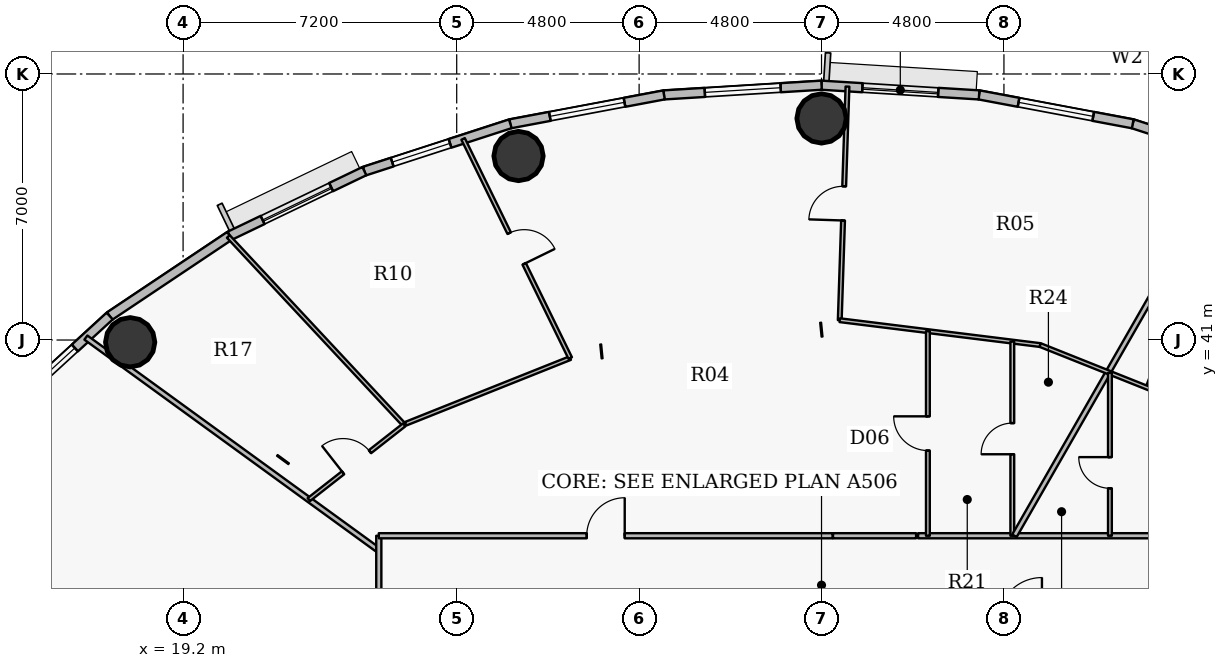
"""IFC4 building model, lengths in metres.
Left out: names, types, materials, properties, quantities, classifications, styles, units other than length and angle.
Written with IfcOpenShell. Run it as: python <this file> out.ifc"""

import sys

from ifc_helpers import new_model, si_unit, direction, frame, frame_2d, origin, origin_2d, place, context, subcontext, project, spatial, rectangle, hollow_circle, extrude, source, transform, mapped, element, fill, save


model = new_model("IFC4")
c1 = context("Model", 3, precision=1e-05, world=origin(), true_north=direction((0.0, 1.0)))
c2 = subcontext(c1, "Body", "Model", "MODEL_VIEW")
j1 = project(units=[si_unit("LENGTHUNIT", "METRE"), si_unit("PLANEANGLEUNIT", "RADIAN")], contexts=[c1])
p1 = place(None, origin())
s1 = spatial("IfcSite", under=j1, at=p1, CompositionType="ELEMENT")
p2 = place(p1, origin())
s2 = spatial("IfcBuilding", under=s1, at=p2, CompositionType="ELEMENT")
p3 = place(p2, frame((0.0, 0.0, 193.65)))
s3 = spatial("IfcBuildingStorey", under=s2, at=p3, CompositionType="ELEMENT", Elevation=193.65)
for number, where, z_axis, x_axis in (
    (1, (36.0, 46.83, 0.0), (0.0, 0.0, 1.0), (1.0, 0.0, 0.0)),
    (2, (28.027, 45.841, 0.0), (0.0, 0.0, 1.0), (1.0, 0.0, 0.0)),
    (3, (17.808, 40.942, 0.0), (0.0, 0.0, 1.0), (1.0, 0.0, 0.0)),
):
    element("IfcColumn", number, at=place(p3, frame(where, z_axis=z_axis, x_axis=x_axis)), inside=s3, PredefinedType="COLUMN", context=c2, shape_type="SweptSolid", body=[
        extrude(hollow_circle(Radius=0.65, WallThickness=0.04, at=origin_2d()), origin(), (0.0, 0.0, 1.0), 3.75),
    ])
p4 = place(p3, frame((44.189, 46.689, 0.0), z_axis=(0.0, 0.0, 1.0), x_axis=(0.951209870236, -0.30854462038, 0.0)))
e4 = element("IfcWall", 4, at=p4, inside=s3, PredefinedType="SOLIDWALL", context=c2, shape_type="SweptSolid", body=[
    extrude(rectangle(XDim=4.038, YDim=0.24, at=frame_2d((2.019, 0.0))), origin(), (0.0, 0.0, 1.0), 3.5),
])
p5 = place(p4, frame((0.757, 0.0, 0.9)))
e5 = element("IfcOpeningElement", 5, at=p5, cuts=e4, PredefinedType="OPENING", context=c2, shape_type="SweptSolid", body=[
    extrude(rectangle(XDim=1.6, YDim=1.75, at=origin_2d()), frame((0.8, 0.13, 0.875), z_axis=(0.0, -1.0, 0.0), x_axis=(1.0, 0.0, 0.0)), (0.0, 0.0, 1.0), 0.26),
])
p6 = place(p3, frame((40.146, 47.449, 0.0), z_axis=(0.0, 0.0, 1.0), x_axis=(0.982788108205, -0.184736391573, 0.0)))
e6 = element("IfcWall", 6, at=p6, inside=s3, PredefinedType="SOLIDWALL", context=c2, shape_type="SweptSolid", body=[
    extrude(rectangle(XDim=4.114, YDim=0.24, at=frame_2d((2.057, 0.0))), origin(), (0.0, 0.0, 1.0), 3.5),
])
p7 = place(p6, frame((1.057, 0.0, 0.9)))
e7 = element("IfcOpeningElement", 7, at=p7, cuts=e6, PredefinedType="OPENING", context=c2, shape_type="SweptSolid", body=[
    extrude(rectangle(XDim=2.0, YDim=1.75, at=origin_2d()), frame((1.0, 0.13, 0.875), z_axis=(0.0, -1.0, 0.0), x_axis=(1.0, 0.0, 0.0)), (0.0, 0.0, 1.0), 0.26),
])
p8 = place(p3, frame((36.0, 47.705, 0.0), z_axis=(0.0, 0.0, 1.0), x_axis=(0.998104600619, -0.061540281305, 0.0)))
e8 = element("IfcWall", 8, at=p8, inside=s3, PredefinedType="SOLIDWALL", context=c2, shape_type="SweptSolid", body=[
    extrude(rectangle(XDim=4.154, YDim=0.24, at=frame_2d((2.077, 0.0))), origin(), (0.0, 0.0, 1.0), 3.5),
])
p9 = place(p8, frame((1.077, 0.0, 0.9)))
e9 = element("IfcOpeningElement", 9, at=p9, cuts=e8, PredefinedType="OPENING", context=c2, shape_type="SweptSolid", body=[
    extrude(rectangle(XDim=2.0, YDim=1.75, at=origin_2d()), frame((1.0, 0.13, 0.875), z_axis=(0.0, -1.0, 0.0), x_axis=(1.0, 0.0, 0.0)), (0.0, 0.0, 1.0), 0.26),
])
p10 = place(p3, frame((31.854, 47.449, 0.0), z_axis=(0.0, 0.0, 1.0), x_axis=(0.998104600619, 0.061540281305, 0.0)))
e10 = element("IfcWall", 10, at=p10, inside=s3, PredefinedType="SOLIDWALL", context=c2, shape_type="SweptSolid", body=[
    extrude(rectangle(XDim=4.154, YDim=0.24, at=frame_2d((2.077, 0.0))), origin(), (0.0, 0.0, 1.0), 3.5),
])
p11 = place(p10, frame((1.077, 0.0, 0.9)))
e11 = element("IfcOpeningElement", 11, at=p11, cuts=e10, PredefinedType="OPENING", context=c2, shape_type="SweptSolid", body=[
    extrude(rectangle(XDim=2.0, YDim=1.75, at=origin_2d()), frame((1.0, 0.13, 0.875), z_axis=(0.0, -1.0, 0.0), x_axis=(1.0, 0.0, 0.0)), (0.0, 0.0, 1.0), 0.26),
])
p12 = place(p3, frame((27.811, 46.689, 0.0), z_axis=(0.0, 0.0, 1.0), x_axis=(0.982788108205, 0.184736391573, 0.0)))
e12 = element("IfcWall", 12, at=p12, inside=s3, PredefinedType="SOLIDWALL", context=c2, shape_type="SweptSolid", body=[
    extrude(rectangle(XDim=4.114, YDim=0.24, at=frame_2d((2.057, 0.0))), origin(), (0.0, 0.0, 1.0), 3.5),
])
p13 = place(p12, frame((1.057, 0.0, 0.9)))
e13 = element("IfcOpeningElement", 13, at=p13, cuts=e12, PredefinedType="OPENING", context=c2, shape_type="SweptSolid", body=[
    extrude(rectangle(XDim=2.0, YDim=1.75, at=origin_2d()), frame((1.0, 0.13, 0.875), z_axis=(0.0, -1.0, 0.0), x_axis=(1.0, 0.0, 0.0)), (0.0, 0.0, 1.0), 0.26),
])
p14 = place(p3, frame((23.97, 45.444, 0.0), z_axis=(0.0, 0.0, 1.0), x_axis=(0.951209870236, 0.30854462038, 0.0)))
e14 = element("IfcWall", 14, at=p14, inside=s3, PredefinedType="SOLIDWALL", context=c2, shape_type="SweptSolid", body=[
    extrude(rectangle(XDim=4.038, YDim=0.24, at=frame_2d((2.019, 0.0))), origin(), (0.0, 0.0, 1.0), 3.5),
])
p15 = place(p14, frame((0.77, 0.0, 0.9)))
e15 = element("IfcOpeningElement", 15, at=p15, cuts=e14, PredefinedType="OPENING", context=c2, shape_type="SweptSolid", body=[
    extrude(rectangle(XDim=1.6, YDim=1.75, at=origin_2d()), frame((0.8, 0.13, 0.875), z_axis=(0.0, -1.0, 0.0), x_axis=(1.0, 0.0, 0.0)), (0.0, 0.0, 1.0), 0.26),
])
p16 = place(p3, frame((20.427, 43.743, 0.0), z_axis=(0.0, 0.0, 1.0), x_axis=(0.901564733809, 0.432644231155, 0.0)))
e16 = element("IfcWall", 16, at=p16, inside=s3, PredefinedType="SOLIDWALL", context=c2, shape_type="SweptSolid", body=[
    extrude(rectangle(XDim=3.93, YDim=0.24, at=frame_2d((1.965, 0.0))), origin(), (0.0, 0.0, 1.0), 3.5),
])
p17 = place(p16, frame((0.96, 0.0, 0.9)))
e17 = element("IfcOpeningElement", 17, at=p17, cuts=e16, PredefinedType="OPENING", context=c2, shape_type="SweptSolid", body=[
    extrude(rectangle(XDim=2.0, YDim=1.75, at=origin_2d()), frame((1.0, 0.13, 0.875), z_axis=(0.0, -1.0, 0.0), x_axis=(1.0, 0.0, 0.0)), (0.0, 0.0, 1.0), 0.26),
])
p18 = place(p3, frame((17.268, 41.631, 0.0), z_axis=(0.0, 0.0, 1.0), x_axis=(0.831228998277, 0.555930168657, 0.0)))
e18 = element("IfcWall", 18, at=p18, inside=s3, PredefinedType="SOLIDWALL", context=c2, shape_type="SweptSolid", body=[
    extrude(rectangle(XDim=3.8, YDim=0.24, at=frame_2d((1.9, 0.0))), origin(), (0.0, 0.0, 1.0), 3.5),
])
p19 = place(p3, frame((14.572, 39.158, 0.0), z_axis=(0.0, 0.0, 1.0), x_axis=(0.737076565834, 0.675809245349, 0.0)))
e19 = element("IfcWall", 19, at=p19, inside=s3, PredefinedType="SOLIDWALL", context=c2, shape_type="SweptSolid", body=[
    extrude(rectangle(XDim=3.658, YDim=0.24, at=frame_2d((1.829, 0.0))), origin(), (0.0, 0.0, 1.0), 3.5),
])
p20 = place(p19, frame((0.815, 0.0, 0.9)))
e20 = element("IfcOpeningElement", 20, at=p20, cuts=e19, PredefinedType="OPENING", context=c2, shape_type="SweptSolid", body=[
    extrude(rectangle(XDim=1.6, YDim=1.75, at=origin_2d()), frame((0.8, 0.13, 0.875), z_axis=(0.0, -1.0, 0.0), x_axis=(1.0, 0.0, 0.0)), (0.0, 0.0, 1.0), 0.26),
])
p21 = place(p3, frame((16.643, 41.064, 0.0), z_axis=(0.0, 0.0, 1.0), x_axis=(0.809016355942, -0.587786131018, 0.0)))
e21 = element("IfcWall", 21, at=p21, inside=s3, PredefinedType="PARTITIONING", context=c2, shape_type="SweptSolid", body=[
    extrude(rectangle(XDim=9.527, YDim=0.135, at=frame_2d((4.764, 0.0))), origin(), (0.0, 0.0, 1.0), 2.935),
])
p22 = place(p3, frame((20.39, 43.725, 0.0), z_axis=(0.0, 0.0, 1.0), x_axis=(0.682297728918, -0.73107442105, 0.0)))
e22 = element("IfcWall", 22, at=p22, inside=s3, PredefinedType="PARTITIONING", context=c2, shape_type="SweptSolid", body=[
    extrude(rectangle(XDim=6.782, YDim=0.1, at=frame_2d((3.391, 0.0))), origin(), (0.0, 0.0, 1.0), 2.935),
])
p23 = place(p3, frame((22.509, 36.802, 0.0), z_axis=(0.0, 0.0, 1.0), x_axis=(0.787322269852, 0.616541680177, 0.0)))
e23 = element("IfcWall", 23, at=p23, inside=s3, PredefinedType="PARTITIONING", context=c2, shape_type="SweptSolid", body=[
    extrude(rectangle(XDim=3.187, YDim=0.1, at=frame_2d((1.593, 0.0))), origin(), (0.0, 0.0, 1.0), 2.935),
])
p24 = place(p23, frame((1.143, 0.0, 0.0)))
e24 = element("IfcOpeningElement", 24, at=p24, cuts=e23, PredefinedType="OPENING", context=c2, shape_type="SweptSolid", body=[
    extrude(rectangle(XDim=0.9, YDim=2.1, at=origin_2d()), frame((0.45, 0.06, 1.05), z_axis=(0.0, -1.0, 0.0), x_axis=(1.0, 0.0, 0.0)), (0.0, 0.0, 1.0), 0.12),
])
p25 = place(p3, frame((24.35, 27.95, 0.0), z_axis=(0.0, 0.0, 1.0), x_axis=(0.0, 1.0, 0.0)))
e25 = element("IfcWall", 25, at=p25, inside=s3, PredefinedType="PARTITIONING", context=c2, shape_type="SweptSolid", body=[
    extrude(rectangle(XDim=7.9, YDim=0.135, at=frame_2d((3.95, 0.0))), origin(), (0.0, 0.0, 1.0), 2.935),
])
p26 = place(p3, frame((24.35, 35.85, 0.0), z_axis=(0.0, 0.0, 1.0), x_axis=(1.0, 0.0, 0.0)))
e26 = element("IfcWall", 26, at=p26, inside=s3, PredefinedType="PARTITIONING", context=c2, shape_type="SweptSolid", body=[
    extrude(rectangle(XDim=11.942, YDim=0.135, at=frame_2d((5.971, 0.0))), origin(), (0.0, 0.0, 1.0), 2.935),
])
p27 = place(p26, frame((5.471, 0.0, 0.0)))
e27 = element("IfcOpeningElement", 27, at=p27, cuts=e26, PredefinedType="OPENING", context=c2, shape_type="SweptSolid", body=[
    extrude(rectangle(XDim=1.0, YDim=2.15, at=origin_2d()), frame((0.5, 0.078, 1.075), z_axis=(0.0, -1.0, 0.0), x_axis=(1.0, 0.0, 0.0)), (0.0, 0.0, 1.0), 0.155),
])
p28 = place(p3, frame((25.055, 38.796, 0.0), z_axis=(0.0, 0.0, 1.0), x_axis=(0.928801214375, 0.370578337434, 0.0)))
e28 = element("IfcWall", 28, at=p28, inside=s3, PredefinedType="PARTITIONING", context=c2, shape_type="SweptSolid", body=[
    extrude(rectangle(XDim=4.664, YDim=0.1, at=frame_2d((2.332, 0.0))), origin(), (0.0, 0.0, 1.0), 3.5),
])
p29 = place(p3, frame((26.568, 46.292, 0.0), z_axis=(0.0, 0.0, 1.0), x_axis=(0.439223775301, -0.898377690735, 0.0)))
e29 = element("IfcWall", 29, at=p29, inside=s3, PredefinedType="PARTITIONING", context=c2, shape_type="SweptSolid", body=[
    extrude(rectangle(XDim=6.419, YDim=0.1, at=frame_2d((3.209, 0.0))), origin(), (0.0, 0.0, 1.0), 2.935),
])
p30 = place(p29, frame((2.76, 0.0, 0.0)))
e30 = element("IfcOpeningElement", 30, at=p30, cuts=e29, PredefinedType="OPENING", context=c2, shape_type="SweptSolid", body=[
    extrude(rectangle(XDim=0.9, YDim=2.1, at=origin_2d()), frame((0.45, 0.06, 1.05), z_axis=(0.0, -1.0, 0.0), x_axis=(1.0, 0.0, 0.0)), (0.0, 0.0, 1.0), 0.12),
])
p31 = place(p3, frame((36.48, 41.521, 0.0), z_axis=(0.0, 0.0, 1.0), x_axis=(0.033029315495, 0.99945438331, 0.0)))
e31 = element("IfcWall", 31, at=p31, inside=s3, PredefinedType="PARTITIONING", context=c2, shape_type="SweptSolid", body=[
    extrude(rectangle(XDim=6.15, YDim=0.1, at=frame_2d((3.075, 0.0))), origin(), (0.0, 0.0, 1.0), 2.935),
])
p32 = place(p31, frame((2.625, 0.0, 0.0)))
e32 = element("IfcOpeningElement", 32, at=p32, cuts=e31, PredefinedType="OPENING", context=c2, shape_type="SweptSolid", body=[
    extrude(rectangle(XDim=0.9, YDim=2.1, at=origin_2d()), frame((0.45, 0.06, 1.05), z_axis=(0.0, -1.0, 0.0), x_axis=(1.0, 0.0, 0.0)), (0.0, 0.0, 1.0), 0.12),
])
p33 = place(p3, frame((36.48, 41.521, 0.0), z_axis=(0.0, 0.0, 1.0), x_axis=(0.992397562131, -0.123073468612, 0.0)))
e33 = element("IfcWall", 33, at=p33, inside=s3, PredefinedType="PARTITIONING", context=c2, shape_type="SweptSolid", body=[
    extrude(rectangle(XDim=5.314, YDim=0.1, at=frame_2d((2.657, 0.0))), origin(), (0.0, 0.0, 1.0), 3.5),
])
p34 = place(p3, frame((38.541, 35.85, 0.0), z_axis=(0.0, 0.0, 1.0), x_axis=(1.0, 0.0, 0.0)))
e34 = element("IfcWall", 34, at=p34, inside=s3, PredefinedType="PARTITIONING", context=c2, shape_type="SweptSolid", body=[
    extrude(rectangle(XDim=14.913, YDim=0.135, at=frame_2d((7.456, 0.0))), origin(), (0.0, 0.0, 1.0), 2.935),
])
p35 = place(p34, frame((9.46, 0.0, 0.0)))
e35 = element("IfcOpeningElement", 35, at=p35, cuts=e34, PredefinedType="OPENING", context=c2, shape_type="SweptSolid", body=[
    extrude(rectangle(XDim=1.0, YDim=2.15, at=origin_2d()), frame((0.5, 0.078, 1.075), z_axis=(0.0, -1.0, 0.0), x_axis=(1.0, 0.0, 0.0)), (0.0, 0.0, 1.0), 0.155),
])
p36 = place(p3, frame((38.799, 35.85, 0.0), z_axis=(0.0, 0.0, 1.0), x_axis=(0.0, 1.0, 0.0)))
e36 = element("IfcWall", 36, at=p36, inside=s3, PredefinedType="PARTITIONING", context=c2, shape_type="SweptSolid", body=[
    extrude(rectangle(XDim=5.384, YDim=0.1, at=frame_2d((2.692, 0.0))), origin(), (0.0, 0.0, 1.0), 3.5),
])
p37 = place(p36, frame((2.242, 0.0, 0.0)))
e37 = element("IfcOpeningElement", 37, at=p37, cuts=e36, PredefinedType="OPENING", context=c2, shape_type="SweptSolid", body=[
    extrude(rectangle(XDim=0.9, YDim=2.1, at=origin_2d()), frame((0.45, 0.06, 1.05), z_axis=(0.0, -1.0, 0.0), x_axis=(1.0, 0.0, 0.0)), (0.0, 0.0, 1.0), 0.12),
])
p38 = place(p3, frame((41.02, 35.85, 0.0), z_axis=(0.0, 0.0, 1.0), x_axis=(0.0, 1.0, 0.0)))
e38 = element("IfcWall", 38, at=p38, inside=s3, PredefinedType="PARTITIONING", context=c2, shape_type="SweptSolid", body=[
    extrude(rectangle(XDim=5.108, YDim=0.1, at=frame_2d((2.554, 0.0))), origin(), (0.0, 0.0, 1.0), 3.5),
])
p39 = place(p38, frame((2.144, 0.0, 0.0)))
e39 = element("IfcOpeningElement", 39, at=p39, cuts=e38, PredefinedType="OPENING", context=c2, shape_type="SweptSolid", body=[
    extrude(rectangle(XDim=0.82, YDim=2.1, at=origin_2d()), frame((0.41, 0.06, 1.05), z_axis=(0.0, -1.0, 0.0), x_axis=(1.0, 0.0, 0.0)), (0.0, 0.0, 1.0), 0.12),
])
p40 = place(p3, frame((41.076, 35.85, 0.0), z_axis=(0.0, 0.0, 1.0), x_axis=(0.497557605347, 0.867430936364, 0.0)))
e40 = element("IfcWall", 40, at=p40, inside=s3, PredefinedType="PARTITIONING", context=c2, shape_type="SweptSolid", body=[
    extrude(rectangle(XDim=11.522, YDim=0.135, at=frame_2d((5.761, 0.0))), origin(), (0.0, 0.0, 1.0), 2.935),
])
p41 = place(p3, frame((41.754, 40.867, 0.0), z_axis=(0.0, 0.0, 1.0), x_axis=(0.928792710591, -0.370599650233, 0.0)))
e41 = element("IfcWall", 41, at=p41, inside=s3, PredefinedType="PARTITIONING", context=c2, shape_type="SweptSolid", body=[
    extrude(rectangle(XDim=5.588, YDim=0.1, at=frame_2d((2.794, 0.0))), origin(), (0.0, 0.0, 1.0), 2.935),
])
p42 = place(p41, frame((3.156, 0.0, 0.0)))
e42 = element("IfcOpeningElement", 42, at=p42, cuts=e41, PredefinedType="OPENING", context=c2, shape_type="SweptSolid", body=[
    extrude(rectangle(XDim=0.9, YDim=2.1, at=origin_2d()), frame((0.45, 0.06, 1.05), z_axis=(0.0, -1.0, 0.0), x_axis=(1.0, 0.0, 0.0)), (0.0, 0.0, 1.0), 0.12),
])
p43 = place(p3, frame((43.589, 35.85, 0.0), z_axis=(0.0, 0.0, 1.0), x_axis=(0.0, 1.0, 0.0)))
e43 = element("IfcWall", 43, at=p43, inside=s3, PredefinedType="PARTITIONING", context=c2, shape_type="SweptSolid", body=[
    extrude(rectangle(XDim=4.285, YDim=0.1, at=frame_2d((2.143, 0.0))), origin(), (0.0, 0.0, 1.0), 2.935),
])
p44 = place(p43, frame((1.249, 0.0, 0.0)))
e44 = element("IfcOpeningElement", 44, at=p44, cuts=e43, PredefinedType="OPENING", context=c2, shape_type="SweptSolid", body=[
    extrude(rectangle(XDim=0.82, YDim=2.1, at=origin_2d()), frame((0.41, 0.06, 1.05), z_axis=(0.0, -1.0, 0.0), x_axis=(1.0, 0.0, 0.0)), (0.0, 0.0, 1.0), 0.12),
])
p45 = place(p3, frame((36.302, 35.85, 0.0), z_axis=(0.0, 0.0, 1.0), x_axis=(1.0, 0.0, 0.0)))
e45 = element("IfcWall", 45, at=p45, inside=s3, PredefinedType="PARTITIONING", context=c2, shape_type="SweptSolid", body=[
    extrude(rectangle(XDim=2.187, YDim=0.135, at=frame_2d((1.093, 0.0))), origin(), (0.0, 0.0, 1.0), 3.5),
])
m1 = source(origin(), c2, "Body", "SweptSolid", [
    extrude(rectangle(XDim=2.0, YDim=1.75, at=origin_2d()), frame((1.0, 0.03, 0.875), z_axis=(0.0, -1.0, 0.0), x_axis=(1.0, 0.0, 0.0)), (0.0, 0.0, 1.0), 0.06),
])
p46 = place(p7, origin())
e46 = element("IfcWindow", 46, at=p46, inside=s3, PartitioningType="DOUBLE_PANEL_VERTICAL", PredefinedType="WINDOW", context=c2, shape_type="MappedRepresentation", body=[
    mapped(m1, transform((0.0, 0.0, 0.0), x_axis=(1.0, 0.0, 0.0), y_axis=(0.0, 1.0, 0.0), z_axis=(0.0, 0.0, 1.0), scale=1.0)),
])
fill(e7, e46)
p47 = place(p9, origin())
e47 = element("IfcWindow", 47, at=p47, inside=s3, PartitioningType="DOUBLE_PANEL_VERTICAL", PredefinedType="WINDOW", context=c2, shape_type="MappedRepresentation", body=[
    mapped(m1, transform((0.0, 0.0, 0.0), x_axis=(1.0, 0.0, 0.0), y_axis=(0.0, 1.0, 0.0), z_axis=(0.0, 0.0, 1.0), scale=1.0)),
])
fill(e9, e47)
p48 = place(p11, origin())
e48 = element("IfcWindow", 48, at=p48, inside=s3, PartitioningType="DOUBLE_PANEL_VERTICAL", PredefinedType="WINDOW", context=c2, shape_type="MappedRepresentation", body=[
    mapped(m1, transform((0.0, 0.0, 0.0), x_axis=(1.0, 0.0, 0.0), y_axis=(0.0, 1.0, 0.0), z_axis=(0.0, 0.0, 1.0), scale=1.0)),
])
fill(e11, e48)
p49 = place(p13, origin())
e49 = element("IfcWindow", 49, at=p49, inside=s3, PartitioningType="DOUBLE_PANEL_VERTICAL", PredefinedType="WINDOW", context=c2, shape_type="MappedRepresentation", body=[
    mapped(m1, transform((0.0, 0.0, 0.0), x_axis=(1.0, 0.0, 0.0), y_axis=(0.0, 1.0, 0.0), z_axis=(0.0, 0.0, 1.0), scale=1.0)),
])
fill(e13, e49)
m2 = source(origin(), c2, "Body", "SweptSolid", [
    extrude(rectangle(XDim=1.6, YDim=1.75, at=origin_2d()), frame((0.8, 0.03, 0.875), z_axis=(0.0, -1.0, 0.0), x_axis=(1.0, 0.0, 0.0)), (0.0, 0.0, 1.0), 0.06),
])
p50 = place(p15, origin())
e50 = element("IfcWindow", 50, at=p50, inside=s3, PartitioningType="DOUBLE_PANEL_VERTICAL", PredefinedType="WINDOW", context=c2, shape_type="MappedRepresentation", body=[
    mapped(m2, transform((0.0, 0.0, 0.0), x_axis=(1.0, 0.0, 0.0), y_axis=(0.0, 1.0, 0.0), z_axis=(0.0, 0.0, 1.0), scale=1.0)),
])
fill(e15, e50)
p51 = place(p17, origin())
e51 = element("IfcWindow", 51, at=p51, inside=s3, PartitioningType="DOUBLE_PANEL_VERTICAL", PredefinedType="WINDOW", context=c2, shape_type="MappedRepresentation", body=[
    mapped(m1, transform((0.0, 0.0, 0.0), x_axis=(1.0, 0.0, 0.0), y_axis=(0.0, 1.0, 0.0), z_axis=(0.0, 0.0, 1.0), scale=1.0)),
])
fill(e17, e51)
p52 = place(p20, origin())
e52 = element("IfcWindow", 52, at=p52, inside=s3, PartitioningType="DOUBLE_PANEL_VERTICAL", PredefinedType="WINDOW", context=c2, shape_type="MappedRepresentation", body=[
    mapped(m2, transform((0.0, 0.0, 0.0), x_axis=(1.0, 0.0, 0.0), y_axis=(0.0, 1.0, 0.0), z_axis=(0.0, 0.0, 1.0), scale=1.0)),
])
fill(e20, e52)
m3 = source(origin(), c2, "Body", "SweptSolid", [
    extrude(rectangle(XDim=0.82, YDim=2.1, at=origin_2d()), frame((0.41, 0.025, 1.05), z_axis=(0.0, -1.0, 0.0), x_axis=(1.0, 0.0, 0.0)), (0.0, 0.0, 1.0), 0.05),
])
p53 = place(p44, origin())
e53 = element("IfcDoor", 53, at=p53, inside=s3, OperationType="SINGLE_SWING_RIGHT", PredefinedType="DOOR", context=c2, shape_type="MappedRepresentation", body=[
    mapped(m3, transform((0.0, 0.0, 0.0), x_axis=(1.0, 0.0, 0.0), y_axis=(0.0, 1.0, 0.0), z_axis=(0.0, 0.0, 1.0), scale=1.0)),
])
fill(e44, e53)
m4 = source(origin(), c2, "Body", "SweptSolid", [
    extrude(rectangle(XDim=1.0, YDim=2.15, at=origin_2d()), frame((0.5, 0.025, 1.075), z_axis=(0.0, -1.0, 0.0), x_axis=(1.0, 0.0, 0.0)), (0.0, 0.0, 1.0), 0.05),
])
p54 = place(p27, origin())
e54 = element("IfcDoor", 54, at=p54, inside=s3, OperationType="SINGLE_SWING_RIGHT", PredefinedType="DOOR", context=c2, shape_type="MappedRepresentation", body=[
    mapped(m4, transform((0.0, 0.0, 0.0), x_axis=(1.0, 0.0, 0.0), y_axis=(0.0, 1.0, 0.0), z_axis=(0.0, 0.0, 1.0), scale=1.0)),
])
fill(e27, e54)
m5 = source(origin(), c2, "Body", "SweptSolid", [
    extrude(rectangle(XDim=0.9, YDim=2.1, at=origin_2d()), frame((0.45, 0.025, 1.05), z_axis=(0.0, -1.0, 0.0), x_axis=(1.0, 0.0, 0.0)), (0.0, 0.0, 1.0), 0.05),
])
p55 = place(p32, origin())
e55 = element("IfcDoor", 55, at=p55, inside=s3, OperationType="SINGLE_SWING_LEFT", PredefinedType="DOOR", context=c2, shape_type="MappedRepresentation", body=[
    mapped(m5, transform((0.0, 0.0, 0.0), x_axis=(1.0, 0.0, 0.0), y_axis=(0.0, 1.0, 0.0), z_axis=(0.0, 0.0, 1.0), scale=1.0)),
])
fill(e32, e55)
p56 = place(p30, origin())
e56 = element("IfcDoor", 56, at=p56, inside=s3, OperationType="SINGLE_SWING_RIGHT", PredefinedType="DOOR", context=c2, shape_type="MappedRepresentation", body=[
    mapped(m5, transform((0.0, 0.0, 0.0), x_axis=(1.0, 0.0, 0.0), y_axis=(0.0, 1.0, 0.0), z_axis=(0.0, 0.0, 1.0), scale=1.0)),
])
fill(e30, e56)
p57 = place(p24, origin())
e57 = element("IfcDoor", 57, at=p57, inside=s3, OperationType="SINGLE_SWING_LEFT", PredefinedType="DOOR", context=c2, shape_type="MappedRepresentation", body=[
    mapped(m5, transform((0.0, 0.0, 0.0), x_axis=(1.0, 0.0, 0.0), y_axis=(0.0, 1.0, 0.0), z_axis=(0.0, 0.0, 1.0), scale=1.0)),
])
fill(e24, e57)
p58 = place(p37, origin())
e58 = element("IfcDoor", 58, at=p58, inside=s3, OperationType="SINGLE_SWING_RIGHT", PredefinedType="DOOR", context=c2, shape_type="MappedRepresentation", body=[
    mapped(m5, transform((0.0, 0.0, 0.0), x_axis=(1.0, 0.0, 0.0), y_axis=(0.0, 1.0, 0.0), z_axis=(0.0, 0.0, 1.0), scale=1.0)),
])
fill(e37, e58)
p59 = place(p39, origin())
e59 = element("IfcDoor", 59, at=p59, inside=s3, OperationType="SINGLE_SWING_LEFT", PredefinedType="DOOR", context=c2, shape_type="MappedRepresentation", body=[
    mapped(m3, transform((0.0, 0.0, 0.0), x_axis=(1.0, 0.0, 0.0), y_axis=(0.0, 1.0, 0.0), z_axis=(0.0, 0.0, 1.0), scale=1.0)),
])
fill(e39, e59)
save(model, sys.argv[1])
